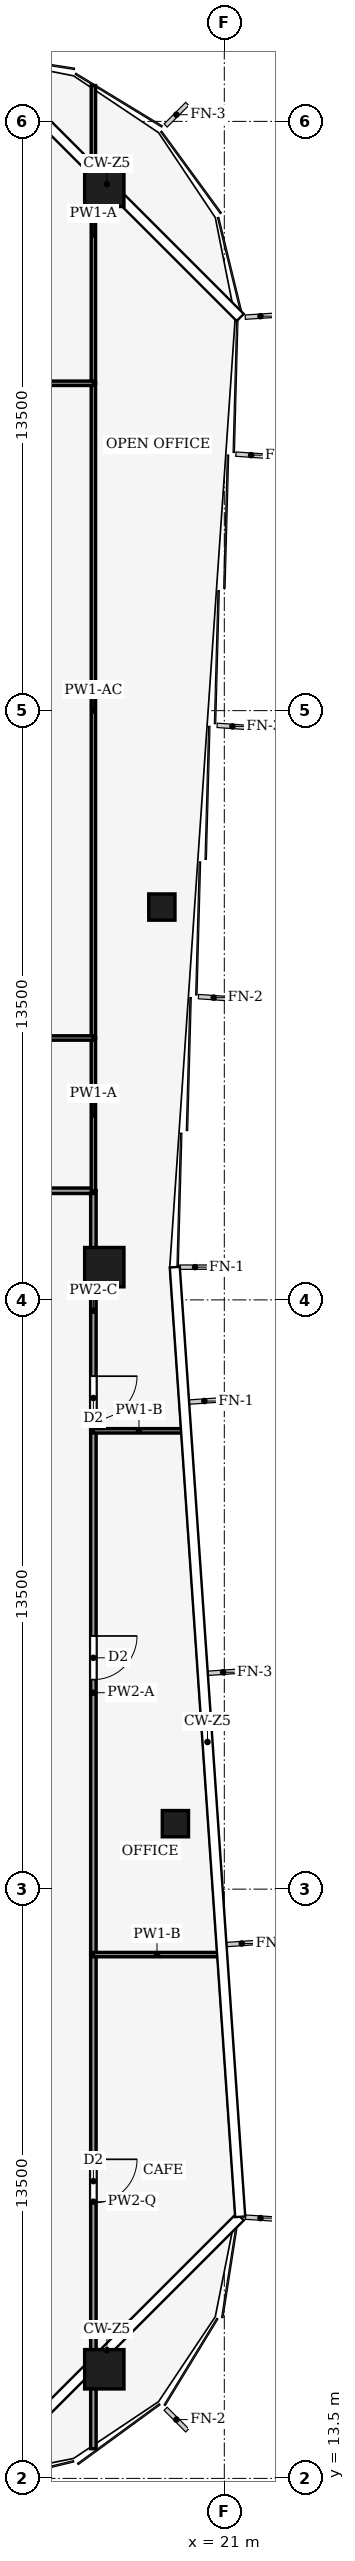
"""IFC4 building model, lengths in metres.
Left out: names, types, materials, properties, quantities, classifications, styles, units other than length and angle.
Written with IfcOpenShell. Run it as: python <this file> out.ifc"""

import sys

from ifc_helpers import new_model, si_unit, direction, frame, frame_2d, origin, origin_2d, place, context, subcontext, project, spatial, rectangle, hollow_rectangle, extrude, element, fill, save


model = new_model("IFC4")
c1 = context("Model", 3, precision=1e-05, world=origin(), true_north=direction((0.0, 1.0)))
c2 = subcontext(c1, "Body", "Model", "MODEL_VIEW")
j1 = project(units=[si_unit("LENGTHUNIT", "METRE"), si_unit("PLANEANGLEUNIT", "RADIAN")], contexts=[c1])
p1 = place(None, origin())
s1 = spatial("IfcSite", under=j1, at=p1, CompositionType="ELEMENT")
p2 = place(p1, origin())
s2 = spatial("IfcBuilding", under=s1, at=p2, CompositionType="ELEMENT")
p3 = place(p2, frame((0.0, 0.0, 289.0)))
s3 = spatial("IfcBuildingStorey", under=s2, at=p3, CompositionType="ELEMENT", Elevation=289.0)
for number, where, z_axis, x_axis in (
    (1, (18.25, 66.0, 0.0), (0.0, 0.0, 1.0), (1.0, 0.0, 0.0)),
    (2, (18.25, 41.25, 0.0), (0.0, 0.0, 1.0), (1.0, 0.0, 0.0)),
    (3, (18.25, 16.0, 0.0), (0.0, 0.0, 1.0), (1.0, 0.0, 0.0)),
):
    element("IfcColumn", number, at=place(p3, frame(where, z_axis=z_axis, x_axis=x_axis)), inside=s3, PredefinedType="COLUMN", context=c2, shape_type="SweptSolid", body=[
        extrude(hollow_rectangle(XDim=0.9, YDim=0.9, WallThickness=0.04, at=origin_2d()), origin(), (0.0, 0.0, 1.0), 5.0),
    ])
for number, where, z_axis, x_axis in (
    (4, (19.879, 28.5, 0.0), (0.0, 0.0, 1.0), (1.0, 0.0, 0.0)),
    (5, (19.569, 49.5, 0.0), (0.0, 0.0, 1.0), (1.0, 0.0, 0.0)),
):
    element("IfcColumn", number, at=place(p3, frame(where, z_axis=z_axis, x_axis=x_axis)), inside=s3, PredefinedType="COLUMN", context=c2, shape_type="SweptSolid", body=[
        extrude(hollow_rectangle(XDim=0.6, YDim=0.6, WallThickness=0.025, at=origin_2d()), origin(), (0.0, 0.0, 1.0), 5.0),
    ])
p4 = place(p3, frame((18.0, 25.5, 0.0), z_axis=(0.0, 0.0, 1.0), x_axis=(0.0, -1.0, 0.0)))
e6 = element("IfcWall", 6, at=p4, inside=s3, PredefinedType="PARTITIONING", context=c2, shape_type="SweptSolid", body=[
    extrude(rectangle(XDim=11.32, YDim=0.125, at=frame_2d((5.66, 0.0))), origin(), (0.0, 0.0, 1.0), 3.93),
])
p5 = place(p4, frame((4.69, 0.0, 0.0)))
e7 = element("IfcOpeningElement", 7, at=p5, cuts=e6, PredefinedType="OPENING", context=c2, shape_type="SweptSolid", body=[
    extrude(rectangle(XDim=1.0, YDim=2.1, at=frame_2d((0.5, 1.05))), frame((0.0, 0.073, 0.0), z_axis=(0.0, -1.0, 0.0), x_axis=(1.0, 0.0, 0.0)), (0.0, 0.0, 1.0), 0.145),
])
p6 = place(p3, frame((18.0, 37.5, 0.0), z_axis=(0.0, 0.0, 1.0), x_axis=(0.0, -1.0, 0.0)))
e8 = element("IfcWall", 8, at=p6, inside=s3, PredefinedType="PARTITIONING", context=c2, shape_type="SweptSolid", body=[
    extrude(rectangle(XDim=12.0, YDim=0.125, at=frame_2d((6.0, 0.0))), origin(), (0.0, 0.0, 1.0), 4.54),
])
p7 = place(p6, frame((4.7, 0.0, 0.0)))
e9 = element("IfcOpeningElement", 9, at=p7, cuts=e8, PredefinedType="OPENING", context=c2, shape_type="SweptSolid", body=[
    extrude(rectangle(XDim=1.0, YDim=2.1, at=frame_2d((0.5, 1.05))), frame((0.0, 0.073, 0.0), z_axis=(0.0, -1.0, 0.0), x_axis=(1.0, 0.0, 0.0)), (0.0, 0.0, 1.0), 0.145),
])
p8 = place(p3, frame((18.0, 43.004, 0.0), z_axis=(0.0, 0.0, 1.0), x_axis=(0.0, -1.0, 0.0)))
e10 = element("IfcWall", 10, at=p8, inside=s3, PredefinedType="PARTITIONING", context=c2, shape_type="SweptSolid", body=[
    extrude(rectangle(XDim=5.504, YDim=0.125, at=frame_2d((2.752, 0.0))), origin(), (0.0, 0.0, 1.0), 4.14),
])
p9 = place(p8, frame((4.252, 0.0, 0.0)))
e11 = element("IfcOpeningElement", 11, at=p9, cuts=e10, PredefinedType="OPENING", context=c2, shape_type="SweptSolid", body=[
    extrude(rectangle(XDim=1.0, YDim=2.1, at=frame_2d((0.5, 1.05))), frame((0.0, 0.073, 0.0), z_axis=(0.0, -1.0, 0.0), x_axis=(1.0, 0.0, 0.0)), (0.0, 0.0, 1.0), 0.145),
])
p10 = place(p3, frame((12.0, 43.0, 0.0), z_axis=(0.0, 0.0, 1.0), x_axis=(1.0, 0.0, 0.0)))
e12 = element("IfcWall", 12, at=p10, inside=s3, PredefinedType="PARTITIONING", context=c2, shape_type="SweptSolid", body=[
    extrude(rectangle(XDim=6.0, YDim=0.125, at=frame_2d((3.0, 0.0))), origin(), (0.0, 0.0, 1.0), 4.39),
])
p11 = place(p10, frame((2.1, 0.0, 0.0)))
e13 = element("IfcOpeningElement", 13, at=p11, cuts=e12, PredefinedType="OPENING", context=c2, shape_type="SweptSolid", body=[
    extrude(rectangle(XDim=1.0, YDim=2.1, at=frame_2d((0.5, 1.05))), frame((0.0, 0.073, 0.0), z_axis=(0.0, -1.0, 0.0), x_axis=(1.0, 0.0, 0.0)), (0.0, 0.0, 1.0), 0.145),
])
p12 = place(p3, frame((20.916, 25.5, 0.0), z_axis=(0.0, 0.0, 1.0), x_axis=(-1.0, 0.0, 0.0)))
e14 = element("IfcWall", 14, at=p12, inside=s3, PredefinedType="PARTITIONING", context=c2, shape_type="SweptSolid", body=[
    extrude(rectangle(XDim=2.916, YDim=0.1, at=frame_2d((1.458, 0.0))), origin(), (0.0, 0.0, 1.0), 4.04),
])
p13 = place(p3, frame((20.089, 37.5, 0.0), z_axis=(0.0, 0.0, 1.0), x_axis=(-1.0, 0.0, 0.0)))
e15 = element("IfcWall", 15, at=p13, inside=s3, PredefinedType="PARTITIONING", context=c2, shape_type="SweptSolid", body=[
    extrude(rectangle(XDim=2.089, YDim=0.1, at=frame_2d((1.044, 0.0))), origin(), (0.0, 0.0, 1.0), 4.04),
])
p14 = place(p3, frame((18.0, 46.5, 0.0), z_axis=(0.0, 0.0, 1.0), x_axis=(0.0, -1.0, 0.0)))
e16 = element("IfcWall", 16, at=p14, inside=s3, PredefinedType="PARTITIONING", context=c2, shape_type="SweptSolid", body=[
    extrude(rectangle(XDim=3.5, YDim=0.1, at=frame_2d((1.75, 0.0))), origin(), (0.0, 0.0, 1.0), 4.87),
])
p15 = place(p3, frame((18.0, 61.5, 0.0), z_axis=(0.0, 0.0, 1.0), x_axis=(0.0, -1.0, 0.0)))
e17 = element("IfcWall", 17, at=p15, inside=s3, PredefinedType="PARTITIONING", context=c2, shape_type="SweptSolid", body=[
    extrude(rectangle(XDim=15.0, YDim=0.1, at=frame_2d((7.5, 0.0))), origin(), (0.0, 0.0, 1.0), 4.35),
])
p16 = place(p3, frame((18.0, 68.32, 0.0), z_axis=(0.0, 0.0, 1.0), x_axis=(0.0, -1.0, 0.0)))
e18 = element("IfcWall", 18, at=p16, inside=s3, PredefinedType="PARTITIONING", context=c2, shape_type="SweptSolid", body=[
    extrude(rectangle(XDim=6.82, YDim=0.1, at=frame_2d((3.41, 0.0))), origin(), (0.0, 0.0, 1.0), 4.87),
])
p17 = place(p3, frame((18.0, 46.5, 0.0), z_axis=(0.0, 0.0, 1.0), x_axis=(-1.0, 0.0, 0.0)))
e19 = element("IfcWall", 19, at=p17, inside=s3, PredefinedType="PARTITIONING", context=c2, shape_type="SweptSolid", body=[
    extrude(rectangle(XDim=6.004, YDim=0.1, at=frame_2d((3.002, 0.0))), origin(), (0.0, 0.0, 1.0), 4.39),
])
p18 = place(p3, frame((12.0, 61.5, 0.0), z_axis=(0.0, 0.0, 1.0), x_axis=(1.0, 0.0, 0.0)))
e20 = element("IfcWall", 20, at=p18, inside=s3, PredefinedType="PARTITIONING", context=c2, shape_type="SweptSolid", body=[
    extrude(rectangle(XDim=6.0, YDim=0.1, at=frame_2d((3.0, 0.0))), origin(), (0.0, 0.0, 1.0), 4.24),
])
p19 = place(p18, frame((2.5, 0.0, 0.0)))
e21 = element("IfcOpeningElement", 21, at=p19, cuts=e20, PredefinedType="OPENING", context=c2, shape_type="SweptSolid", body=[
    extrude(rectangle(XDim=1.0, YDim=2.1, at=frame_2d((0.5, 1.05))), frame((0.0, 0.06, 0.0), z_axis=(0.0, -1.0, 0.0), x_axis=(1.0, 0.0, 0.0)), (0.0, 0.0, 1.0), 0.12),
])
p20 = place(p5, origin())
e22 = element("IfcDoor", 22, at=p20, inside=s3, OperationType="SINGLE_SWING_LEFT", PredefinedType="DOOR", context=c2, shape_type="SweptSolid", body=[
    extrude(rectangle(XDim=1.0, YDim=2.1, at=frame_2d((0.5, 1.05))), frame((0.0, 0.025, 0.0), z_axis=(0.0, -1.0, 0.0), x_axis=(1.0, 0.0, 0.0)), (0.0, 0.0, 1.0), 0.05),
])
fill(e7, e22)
p21 = place(p7, origin())
e23 = element("IfcDoor", 23, at=p21, inside=s3, OperationType="SINGLE_SWING_LEFT", PredefinedType="DOOR", context=c2, shape_type="SweptSolid", body=[
    extrude(rectangle(XDim=1.0, YDim=2.1, at=frame_2d((0.5, 1.05))), frame((0.0, 0.025, 0.0), z_axis=(0.0, -1.0, 0.0), x_axis=(1.0, 0.0, 0.0)), (0.0, 0.0, 1.0), 0.05),
])
fill(e9, e23)
p22 = place(p9, origin())
e24 = element("IfcDoor", 24, at=p22, inside=s3, OperationType="SINGLE_SWING_RIGHT", PredefinedType="DOOR", context=c2, shape_type="SweptSolid", body=[
    extrude(rectangle(XDim=1.0, YDim=2.1, at=frame_2d((0.5, 1.05))), frame((0.0, 0.025, 0.0), z_axis=(0.0, -1.0, 0.0), x_axis=(1.0, 0.0, 0.0)), (0.0, 0.0, 1.0), 0.05),
])
fill(e11, e24)
save(model, sys.argv[1])
